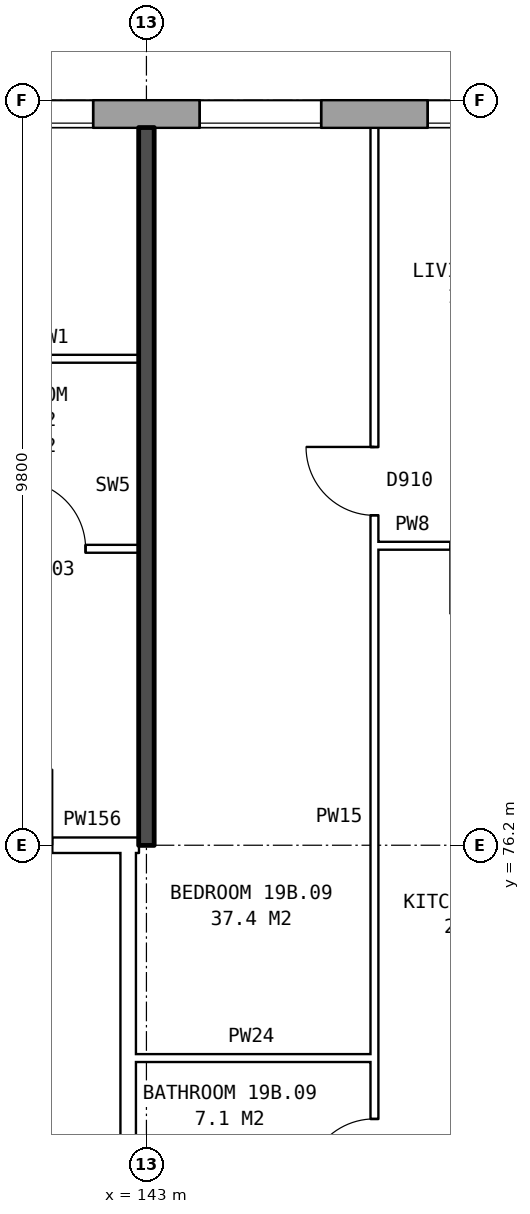
"""IFC4 building model, lengths in metres.
Left out: names, types, materials, properties, quantities, classifications, styles, units other than length and angle.
Written with IfcOpenShell. Run it as: python <this file> out.ifc"""

import sys

from ifc_helpers import new_model, si_unit, direction, frame, frame_2d, origin, place, context, subcontext, project, spatial, rectangle, extrude, element, fill, save


model = new_model("IFC4")
c1 = context("Model", 3, precision=1e-05, world=origin(), true_north=direction((0.0, 1.0)))
c2 = subcontext(c1, "Body", "Model", "MODEL_VIEW")
j1 = project(units=[si_unit("LENGTHUNIT", "METRE"), si_unit("PLANEANGLEUNIT", "RADIAN")], contexts=[c1])
p1 = place(None, origin())
s1 = spatial("IfcSite", under=j1, at=p1, CompositionType="ELEMENT")
p2 = place(p1, origin())
s2 = spatial("IfcBuilding", under=s1, at=p2, CompositionType="ELEMENT")
p3 = place(p2, frame((0.0, 0.0, 71.6)))
s3 = spatial("IfcBuildingStorey", under=s2, at=p3, CompositionType="ELEMENT", Elevation=71.6)
p4 = place(p3, frame((172.175, 85.82, 0.0), z_axis=(0.0, 0.0, 1.0), x_axis=(-1.0, 0.0, 0.0)))
e1 = element("IfcWall", 1, at=p4, inside=s3, PredefinedType="STANDARD", context=c2, shape_type="SweptSolid", body=[
    extrude(rectangle(XDim=38.101, YDim=0.36, at=frame_2d((19.05, 0.0))), origin(), (0.0, 0.0, 1.0), 2.85),
])
p5 = place(p4, frame((0.3, 0.0, 0.8)))
e2 = element("IfcOpeningElement", 2, at=p5, cuts=e1, PredefinedType="OPENING", context=c2, shape_type="SweptSolid", body=[
    extrude(rectangle(XDim=1.0, YDim=1.8, at=frame_2d((0.5, 0.9))), frame((0.0, 0.19, 0.0), z_axis=(0.0, -1.0, 0.0), x_axis=(1.0, 0.0, 0.0)), (0.0, 0.0, 1.0), 0.38),
])
p6 = place(p4, frame((5.875, 0.0, 0.8)))
e3 = element("IfcOpeningElement", 3, at=p6, cuts=e1, PredefinedType="OPENING", context=c2, shape_type="SweptSolid", body=[
    extrude(rectangle(XDim=1.6, YDim=1.8, at=frame_2d((0.8, 0.9))), frame((0.0, 0.19, 0.0), z_axis=(0.0, -1.0, 0.0), x_axis=(1.0, 0.0, 0.0)), (0.0, 0.0, 1.0), 0.38),
])
p7 = place(p4, frame((8.875, 0.0, 0.8)))
e4 = element("IfcOpeningElement", 4, at=p7, cuts=e1, PredefinedType="OPENING", context=c2, shape_type="SweptSolid", body=[
    extrude(rectangle(XDim=1.6, YDim=1.8, at=frame_2d((0.8, 0.9))), frame((0.0, 0.19, 0.0), z_axis=(0.0, -1.0, 0.0), x_axis=(1.0, 0.0, 0.0)), (0.0, 0.0, 1.0), 0.38),
])
p8 = place(p4, frame((11.875, 0.0, 0.8)))
e5 = element("IfcOpeningElement", 5, at=p8, cuts=e1, PredefinedType="OPENING", context=c2, shape_type="SweptSolid", body=[
    extrude(rectangle(XDim=1.6, YDim=1.8, at=frame_2d((0.8, 0.9))), frame((0.0, 0.19, 0.0), z_axis=(0.0, -1.0, 0.0), x_axis=(1.0, 0.0, 0.0)), (0.0, 0.0, 1.0), 0.38),
])
p9 = place(p4, frame((14.875, 0.0, 0.8)))
e6 = element("IfcOpeningElement", 6, at=p9, cuts=e1, PredefinedType="OPENING", context=c2, shape_type="SweptSolid", body=[
    extrude(rectangle(XDim=1.6, YDim=1.8, at=frame_2d((0.8, 0.9))), frame((0.0, 0.19, 0.0), z_axis=(0.0, -1.0, 0.0), x_axis=(1.0, 0.0, 0.0)), (0.0, 0.0, 1.0), 0.38),
])
p10 = place(p4, frame((17.875, 0.0, 0.8)))
e7 = element("IfcOpeningElement", 7, at=p10, cuts=e1, PredefinedType="OPENING", context=c2, shape_type="SweptSolid", body=[
    extrude(rectangle(XDim=1.6, YDim=1.8, at=frame_2d((0.8, 0.9))), frame((0.0, 0.19, 0.0), z_axis=(0.0, -1.0, 0.0), x_axis=(1.0, 0.0, 0.0)), (0.0, 0.0, 1.0), 0.38),
])
p11 = place(p4, frame((20.875, 0.0, 0.8)))
e8 = element("IfcOpeningElement", 8, at=p11, cuts=e1, PredefinedType="OPENING", context=c2, shape_type="SweptSolid", body=[
    extrude(rectangle(XDim=1.6, YDim=1.8, at=frame_2d((0.8, 0.9))), frame((0.0, 0.19, 0.0), z_axis=(0.0, -1.0, 0.0), x_axis=(1.0, 0.0, 0.0)), (0.0, 0.0, 1.0), 0.38),
])
p12 = place(p4, frame((23.875, 0.0, 0.8)))
e9 = element("IfcOpeningElement", 9, at=p12, cuts=e1, PredefinedType="OPENING", context=c2, shape_type="SweptSolid", body=[
    extrude(rectangle(XDim=1.6, YDim=1.8, at=frame_2d((0.8, 0.9))), frame((0.0, 0.19, 0.0), z_axis=(0.0, -1.0, 0.0), x_axis=(1.0, 0.0, 0.0)), (0.0, 0.0, 1.0), 0.38),
])
p13 = place(p4, frame((26.875, 0.0, 0.8)))
e10 = element("IfcOpeningElement", 10, at=p13, cuts=e1, PredefinedType="OPENING", context=c2, shape_type="SweptSolid", body=[
    extrude(rectangle(XDim=1.6, YDim=1.8, at=frame_2d((0.8, 0.9))), frame((0.0, 0.19, 0.0), z_axis=(0.0, -1.0, 0.0), x_axis=(1.0, 0.0, 0.0)), (0.0, 0.0, 1.0), 0.38),
])
p14 = place(p4, frame((29.875, 0.0, 0.8)))
e11 = element("IfcOpeningElement", 11, at=p14, cuts=e1, PredefinedType="OPENING", context=c2, shape_type="SweptSolid", body=[
    extrude(rectangle(XDim=1.6, YDim=1.8, at=frame_2d((0.8, 0.9))), frame((0.0, 0.19, 0.0), z_axis=(0.0, -1.0, 0.0), x_axis=(1.0, 0.0, 0.0)), (0.0, 0.0, 1.0), 0.38),
])
p15 = place(p4, frame((31.775, 0.0, 0.8)))
e12 = element("IfcOpeningElement", 12, at=p15, cuts=e1, PredefinedType="OPENING", context=c2, shape_type="SweptSolid", body=[
    extrude(rectangle(XDim=1.6, YDim=1.8, at=frame_2d((0.8, 0.9))), frame((0.0, 0.19, 0.0), z_axis=(0.0, -1.0, 0.0), x_axis=(1.0, 0.0, 0.0)), (0.0, 0.0, 1.0), 0.38),
])
p16 = place(p4, frame((35.775, 0.0, 1.7)))
e13 = element("IfcOpeningElement", 13, at=p16, cuts=e1, PredefinedType="OPENING", context=c2, shape_type="SweptSolid", body=[
    extrude(rectangle(XDim=0.6, YDim=0.9, at=frame_2d((0.3, 0.45))), frame((0.0, 0.19, 0.0), z_axis=(0.0, -1.0, 0.0), x_axis=(1.0, 0.0, 0.0)), (0.0, 0.0, 1.0), 0.38),
])
p17 = place(p4, frame((1.6, 0.0, 1.6)))
e14 = element("IfcOpeningElement", 14, at=p17, cuts=e1, PredefinedType="OPENING", context=c2, shape_type="SweptSolid", body=[
    extrude(rectangle(XDim=0.6, YDim=0.9, at=frame_2d((0.3, 0.45))), frame((0.0, 0.19, 0.0), z_axis=(0.0, -1.0, 0.0), x_axis=(1.0, 0.0, 0.0)), (0.0, 0.0, 1.0), 0.38),
])
p18 = place(p4, frame((3.5, 0.0, 0.8)))
e15 = element("IfcOpeningElement", 15, at=p18, cuts=e1, PredefinedType="OPENING", context=c2, shape_type="SweptSolid", body=[
    extrude(rectangle(XDim=1.4, YDim=0.9, at=frame_2d((0.7, 0.45))), frame((0.0, 0.19, 0.0), z_axis=(0.0, -1.0, 0.0), x_axis=(1.0, 0.0, 0.0)), (0.0, 0.0, 1.0), 0.38),
])
p19 = place(p4, frame((33.675, 0.0, 0.8)))
e16 = element("IfcOpeningElement", 16, at=p19, cuts=e1, PredefinedType="OPENING", context=c2, shape_type="SweptSolid", body=[
    extrude(rectangle(XDim=0.6, YDim=1.2, at=frame_2d((0.3, 0.6))), frame((0.0, 0.19, 0.0), z_axis=(0.0, -1.0, 0.0), x_axis=(1.0, 0.0, 0.0)), (0.0, 0.0, 1.0), 0.38),
])
p20 = place(p4, frame((36.675, 0.0, 0.8)))
e17 = element("IfcOpeningElement", 17, at=p20, cuts=e1, PredefinedType="OPENING", context=c2, shape_type="SweptSolid", body=[
    extrude(rectangle(XDim=1.0, YDim=1.8, at=frame_2d((0.5, 0.9))), frame((0.0, 0.19, 0.0), z_axis=(0.0, -1.0, 0.0), x_axis=(1.0, 0.0, 0.0)), (0.0, 0.0, 1.0), 0.38),
])
p21 = place(p3, frame((142.76, 63.9, 0.0), z_axis=(0.0, 0.0, 1.0), x_axis=(0.0, 1.0, 0.0)))
e18 = element("IfcWall", 18, at=p21, inside=s3, PredefinedType="PARTITIONING", context=c2, shape_type="SweptSolid", body=[
    extrude(rectangle(XDim=12.2, YDim=0.2, at=frame_2d((6.1, 0.0))), origin(), (0.0, 0.0, 1.0), 2.85),
])
p22 = place(p21, frame((5.1, 0.0, 0.0)))
e19 = element("IfcOpeningElement", 19, at=p22, cuts=e18, PredefinedType="OPENING", context=c2, shape_type="SweptSolid", body=[
    extrude(rectangle(XDim=2.0, YDim=2.1, at=frame_2d((1.0, 1.05))), frame((0.0, 0.11, 0.0), z_axis=(0.0, -1.0, 0.0), x_axis=(1.0, 0.0, 0.0)), (0.0, 0.0, 1.0), 0.22),
])
p23 = place(p3, frame((142.76, 73.4, 0.0), z_axis=(0.0, 0.0, 1.0), x_axis=(1.0, 0.0, 0.0)))
e20 = element("IfcWall", 20, at=p23, inside=s3, PredefinedType="PARTITIONING", context=c2, shape_type="SweptSolid", body=[
    extrude(rectangle(XDim=3.24, YDim=0.1, at=frame_2d((1.62, 0.0))), origin(), (0.0, 0.0, 1.0), 2.85),
])
p24 = place(p3, frame((139.76, 76.2, 0.0), z_axis=(0.0, 0.0, 1.0), x_axis=(1.0, 0.0, 0.0)))
e21 = element("IfcWall", 21, at=p24, inside=s3, PredefinedType="PARTITIONING", context=c2, shape_type="SweptSolid", body=[
    extrude(rectangle(XDim=3.0, YDim=0.2, at=frame_2d((1.5, 0.0))), origin(), (0.0, 0.0, 1.0), 2.85),
])
p25 = place(p24, frame((1.0, 0.0, 0.0)))
e22 = element("IfcOpeningElement", 22, at=p25, cuts=e21, PredefinedType="OPENING", context=c2, shape_type="SweptSolid", body=[
    extrude(rectangle(XDim=1.0, YDim=2.1, at=frame_2d((0.5, 1.05))), frame((0.0, 0.11, 0.0), z_axis=(0.0, -1.0, 0.0), x_axis=(1.0, 0.0, 0.0)), (0.0, 0.0, 1.0), 0.22),
])
p26 = place(p3, frame((142.76, 76.2, 0.0), z_axis=(0.0, 0.0, 1.0), x_axis=(1.0, 0.0, 0.0)))
e23 = element("IfcWall", 23, at=p26, inside=s3, PredefinedType="PARTITIONING", context=c2, shape_type="SweptSolid", body=[
    extrude(rectangle(XDim=0.14, YDim=0.2, at=frame_2d((0.07, 0.0))), origin(), (0.0, 0.0, 1.0), 2.85),
])
p27 = place(p3, frame((137.1, 80.1, 0.0), z_axis=(0.0, 0.0, 1.0), x_axis=(1.0, 0.0, 0.0)))
e24 = element("IfcWall", 24, at=p27, inside=s3, PredefinedType="PARTITIONING", context=c2, shape_type="SweptSolid", body=[
    extrude(rectangle(XDim=5.8, YDim=0.1, at=frame_2d((2.9, 0.0))), origin(), (0.0, 0.0, 1.0), 2.85),
])
p28 = place(p27, frame((1.3, 0.0, 0.0)))
e25 = element("IfcOpeningElement", 25, at=p28, cuts=e24, PredefinedType="OPENING", context=c2, shape_type="SweptSolid", body=[
    extrude(rectangle(XDim=0.9, YDim=2.1, at=frame_2d((0.45, 1.05))), frame((0.0, 0.06, 0.0), z_axis=(0.0, -1.0, 0.0), x_axis=(1.0, 0.0, 0.0)), (0.0, 0.0, 1.0), 0.12),
])
p29 = place(p27, frame((4.2, 0.0, 0.0)))
e26 = element("IfcOpeningElement", 26, at=p29, cuts=e24, PredefinedType="OPENING", context=c2, shape_type="SweptSolid", body=[
    extrude(rectangle(XDim=0.9, YDim=2.1, at=frame_2d((0.45, 1.05))), frame((0.0, 0.06, 0.0), z_axis=(0.0, -1.0, 0.0), x_axis=(1.0, 0.0, 0.0)), (0.0, 0.0, 1.0), 0.12),
])
p30 = place(p3, frame((146.0, 80.14, 0.0), z_axis=(0.0, 0.0, 1.0), x_axis=(1.0, 0.0, 0.0)))
e27 = element("IfcWall", 27, at=p30, inside=s3, PredefinedType="PARTITIONING", context=c2, shape_type="SweptSolid", body=[
    extrude(rectangle(XDim=2.9, YDim=0.1, at=frame_2d((1.45, 0.0))), origin(), (0.0, 0.0, 1.0), 2.85),
])
p31 = place(p30, frame((1.0, 0.0, 0.0)))
e28 = element("IfcOpeningElement", 28, at=p31, cuts=e27, PredefinedType="OPENING", context=c2, shape_type="SweptSolid", body=[
    extrude(rectangle(XDim=0.9, YDim=2.1, at=frame_2d((0.45, 1.05))), frame((0.0, 0.06, 0.0), z_axis=(0.0, -1.0, 0.0), x_axis=(1.0, 0.0, 0.0)), (0.0, 0.0, 1.0), 0.12),
])
p32 = place(p3, frame((140.6, 82.6, 0.0), z_axis=(0.0, 0.0, 1.0), x_axis=(1.0, 0.0, 0.0)))
e29 = element("IfcWall", 29, at=p32, inside=s3, PredefinedType="PARTITIONING", context=c2, shape_type="SweptSolid", body=[
    extrude(rectangle(XDim=2.3, YDim=0.1, at=frame_2d((1.15, 0.0))), origin(), (0.0, 0.0, 1.0), 2.85),
])
p33 = place(p3, frame((143.0, 76.2, 0.0), z_axis=(0.0, 0.0, 1.0), x_axis=(0.0, 1.0, 0.0)))
e30 = element("IfcWall", 30, at=p33, inside=s3, PredefinedType="SOLIDWALL", context=c2, shape_type="SweptSolid", body=[
    extrude(rectangle(XDim=9.44, YDim=0.2, at=frame_2d((4.72, 0.0))), origin(), (0.0, 0.0, 1.0), 2.85),
])
p34 = place(p3, frame((146.0, 71.3, 0.0), z_axis=(0.0, 0.0, 1.0), x_axis=(0.0, 1.0, 0.0)))
e31 = element("IfcWall", 31, at=p34, inside=s3, PredefinedType="PARTITIONING", context=c2, shape_type="SweptSolid", body=[
    extrude(rectangle(XDim=14.34, YDim=0.1, at=frame_2d((7.17, 0.0))), origin(), (0.0, 0.0, 1.0), 2.85),
])
p35 = place(p34, frame((9.24, 0.0, 0.0)))
e32 = element("IfcOpeningElement", 32, at=p35, cuts=e31, PredefinedType="OPENING", context=c2, shape_type="SweptSolid", body=[
    extrude(rectangle(XDim=0.9, YDim=2.1, at=frame_2d((0.45, 1.05))), frame((0.0, 0.06, 0.0), z_axis=(0.0, -1.0, 0.0), x_axis=(1.0, 0.0, 0.0)), (0.0, 0.0, 1.0), 0.12),
])
p36 = place(p34, frame((0.4, 0.0, 0.0)))
e33 = element("IfcOpeningElement", 33, at=p36, cuts=e31, PredefinedType="OPENING", context=c2, shape_type="SweptSolid", body=[
    extrude(rectangle(XDim=0.9, YDim=2.1, at=frame_2d((0.45, 1.05))), frame((0.0, 0.06, 0.0), z_axis=(0.0, -1.0, 0.0), x_axis=(1.0, 0.0, 0.0)), (0.0, 0.0, 1.0), 0.12),
])
p37 = place(p12, origin())
e34 = element("IfcWindow", 34, at=p37, inside=s3, PartitioningType="SINGLE_PANEL", PredefinedType="WINDOW", context=c2, shape_type="SweptSolid", body=[
    extrude(rectangle(XDim=1.6, YDim=1.8, at=frame_2d((0.8, 0.9))), frame((0.0, 0.15, 0.0), z_axis=(0.0, -1.0, 0.0), x_axis=(1.0, 0.0, 0.0)), (0.0, 0.0, 1.0), 0.06),
])
fill(e9, e34)
p38 = place(p13, origin())
e35 = element("IfcWindow", 35, at=p38, inside=s3, PartitioningType="SINGLE_PANEL", PredefinedType="WINDOW", context=c2, shape_type="SweptSolid", body=[
    extrude(rectangle(XDim=1.6, YDim=1.8, at=frame_2d((0.8, 0.9))), frame((0.0, 0.15, 0.0), z_axis=(0.0, -1.0, 0.0), x_axis=(1.0, 0.0, 0.0)), (0.0, 0.0, 1.0), 0.06),
])
fill(e10, e35)
p39 = place(p14, origin())
e36 = element("IfcWindow", 36, at=p39, inside=s3, PartitioningType="SINGLE_PANEL", PredefinedType="WINDOW", context=c2, shape_type="SweptSolid", body=[
    extrude(rectangle(XDim=1.6, YDim=1.8, at=frame_2d((0.8, 0.9))), frame((0.0, 0.15, 0.0), z_axis=(0.0, -1.0, 0.0), x_axis=(1.0, 0.0, 0.0)), (0.0, 0.0, 1.0), 0.06),
])
fill(e11, e36)
p40 = place(p29, origin())
e37 = element("IfcDoor", 37, at=p40, inside=s3, OperationType="SINGLE_SWING_LEFT", PredefinedType="DOOR", context=c2, shape_type="SweptSolid", body=[
    extrude(rectangle(XDim=0.9, YDim=2.1, at=frame_2d((0.45, 1.05))), frame((0.0, 0.025, 0.0), z_axis=(0.0, -1.0, 0.0), x_axis=(1.0, 0.0, 0.0)), (0.0, 0.0, 1.0), 0.05),
])
fill(e26, e37)
p41 = place(p35, origin())
e38 = element("IfcDoor", 38, at=p41, inside=s3, OperationType="SINGLE_SWING_RIGHT", PredefinedType="DOOR", context=c2, shape_type="SweptSolid", body=[
    extrude(rectangle(XDim=0.9, YDim=2.1, at=frame_2d((0.45, 1.05))), frame((0.0, 0.025, 0.0), z_axis=(0.0, -1.0, 0.0), x_axis=(1.0, 0.0, 0.0)), (0.0, 0.0, 1.0), 0.05),
])
fill(e32, e38)
p42 = place(p36, origin())
e39 = element("IfcDoor", 39, at=p42, inside=s3, OperationType="SINGLE_SWING_LEFT", PredefinedType="DOOR", context=c2, shape_type="SweptSolid", body=[
    extrude(rectangle(XDim=0.9, YDim=2.1, at=frame_2d((0.45, 1.05))), frame((0.0, 0.025, 0.0), z_axis=(0.0, -1.0, 0.0), x_axis=(1.0, 0.0, 0.0)), (0.0, 0.0, 1.0), 0.05),
])
fill(e33, e39)
save(model, sys.argv[1])
